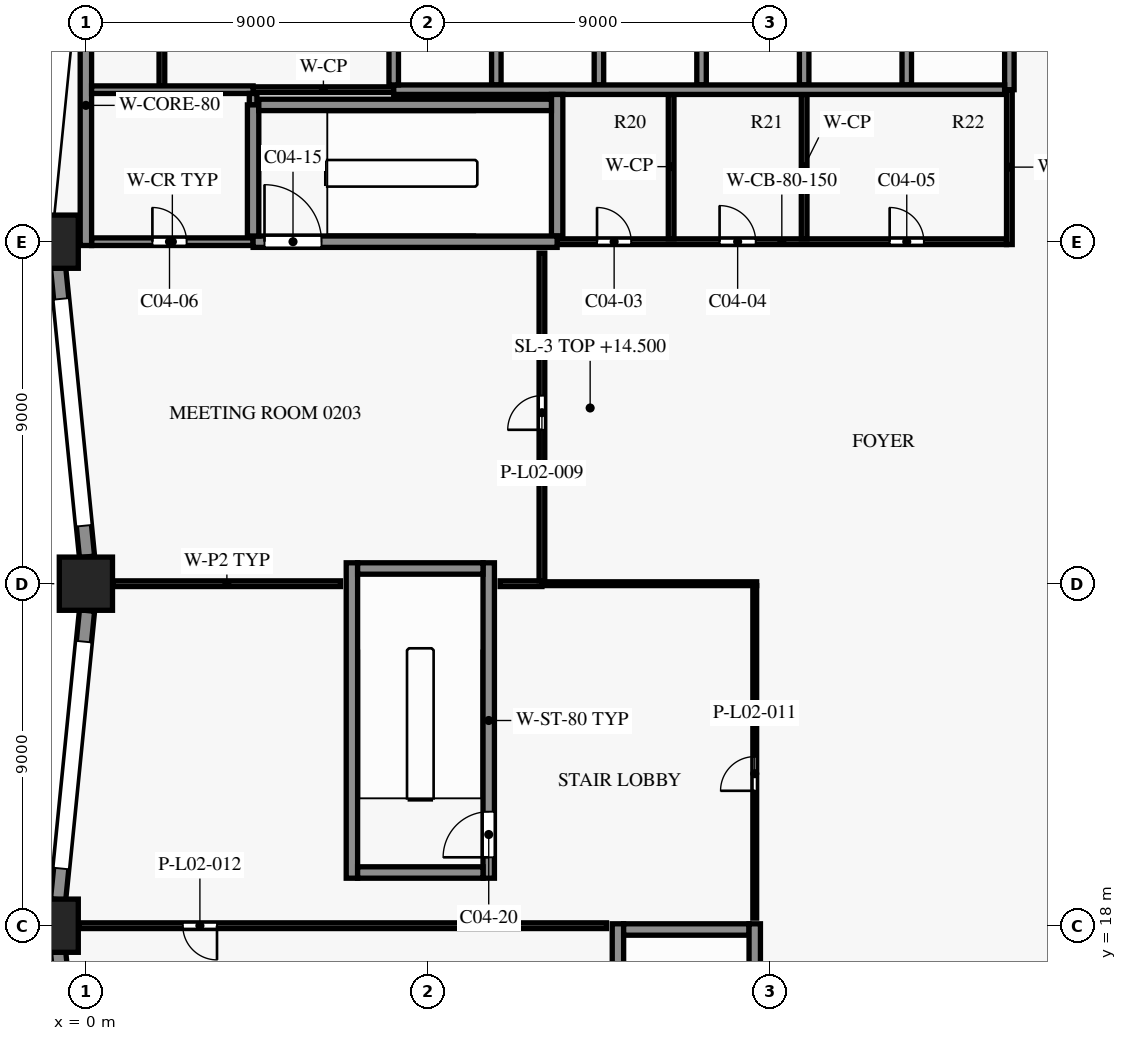
"""IFC4 building model, lengths in metres.
Left out: names, types, materials, properties, quantities, classifications, styles, units other than length and angle.
Written with IfcOpenShell. Run it as: python <this file> out.ifc"""

import sys

from ifc_helpers import new_model, si_unit, direction, frame, frame_2d, origin, origin_2d, place, context, subcontext, project, spatial, rectangle, extrude, element, fill, save


model = new_model("IFC4")
c1 = context("Model", 3, precision=1e-05, world=origin(), true_north=direction((0.0, 1.0)))
c2 = subcontext(c1, "Body", "Model", "MODEL_VIEW")
j1 = project(units=[si_unit("LENGTHUNIT", "METRE"), si_unit("PLANEANGLEUNIT", "RADIAN")], contexts=[c1])
p1 = place(None, origin())
s1 = spatial("IfcSite", under=j1, at=p1, CompositionType="ELEMENT")
p2 = place(p1, origin())
s2 = spatial("IfcBuilding", under=s1, at=p2, CompositionType="ELEMENT")
p3 = place(p2, frame((0.0, 0.0, 14.5)))
s3 = spatial("IfcBuildingStorey", under=s2, at=p3, CompositionType="ELEMENT", Elevation=14.5)
for number, where, z_axis, x_axis in (
    (1, (-0.9, 36.0, 0.0), (0.0, 0.0, 1.0), (1.0, 0.0, 0.0)),
    (2, (0.0, 27.0, 0.0), (0.0, 0.0, 1.0), (1.0, 0.0, 0.0)),
    (3, (-0.9, 18.0, 0.0), (0.0, 0.0, 1.0), (1.0, 0.0, 0.0)),
):
    element("IfcColumn", number, at=place(p3, frame(where, z_axis=z_axis, x_axis=x_axis)), inside=s3, PredefinedType="COLUMN", context=c2, shape_type="SweptSolid", body=[
        extrude(rectangle(XDim=1.4, YDim=1.4, at=origin_2d()), origin(), (0.0, 0.0, 1.0), 5.0),
    ])
p4 = place(p3, frame((0.03, 27.707, 0.0), z_axis=(0.0, 0.0, 1.0), x_axis=(-0.099478423711, 0.995039719416, 0.0)))
e4 = element("IfcWall", 4, at=p4, inside=s3, PredefinedType="SOLIDWALL", context=c2, shape_type="SweptSolid", body=[
    extrude(rectangle(XDim=7.645, YDim=0.4, at=frame_2d((3.822, 0.0))), origin(), (0.0, 0.0, 1.0), 4.1),
])
p5 = place(p4, frame((0.823, 0.0, 0.9)))
e5 = element("IfcOpeningElement", 5, at=p5, cuts=e4, PredefinedType="OPENING", context=c2, shape_type="SweptSolid", body=[
    extrude(rectangle(XDim=6.0, YDim=1.8, at=frame_2d((3.0, 0.9))), frame((0.0, 0.21, 0.0), z_axis=(0.0, -1.0, 0.0), x_axis=(1.0, 0.0, 0.0)), (0.0, 0.0, 1.0), 0.42),
])
p6 = place(p3, frame((-0.731, 18.687, 0.0), z_axis=(0.0, 0.0, 1.0), x_axis=(0.099478423711, 0.995039719416, 0.0)))
e6 = element("IfcWall", 6, at=p6, inside=s3, PredefinedType="SOLIDWALL", context=c2, shape_type="SweptSolid", body=[
    extrude(rectangle(XDim=7.645, YDim=0.4, at=frame_2d((3.822, 0.0))), origin(), (0.0, 0.0, 1.0), 4.1),
])
p7 = place(p6, frame((0.823, 0.0, 0.9)))
e7 = element("IfcOpeningElement", 7, at=p7, cuts=e6, PredefinedType="OPENING", context=c2, shape_type="SweptSolid", body=[
    extrude(rectangle(XDim=6.0, YDim=1.8, at=frame_2d((3.0, 0.9))), frame((0.0, 0.21, 0.0), z_axis=(0.0, -1.0, 0.0), x_axis=(1.0, 0.0, 0.0)), (0.0, 0.0, 1.0), 0.42),
])
p8 = place(p3, frame((0.03, 9.707, 0.0), z_axis=(0.0, 0.0, 1.0), x_axis=(-0.099478423711, 0.995039719416, 0.0)))
e8 = element("IfcWall", 8, at=p8, inside=s3, PredefinedType="SOLIDWALL", context=c2, shape_type="SweptSolid", body=[
    extrude(rectangle(XDim=7.645, YDim=0.4, at=frame_2d((3.822, 0.0))), origin(), (0.0, 0.0, 1.0), 4.1),
])
p9 = place(p8, frame((0.823, 0.0, 0.9)))
e9 = element("IfcOpeningElement", 9, at=p9, cuts=e8, PredefinedType="OPENING", context=c2, shape_type="SweptSolid", body=[
    extrude(rectangle(XDim=6.0, YDim=1.8, at=frame_2d((3.0, 0.9))), frame((0.0, 0.21, 0.0), z_axis=(0.0, -1.0, 0.0), x_axis=(1.0, 0.0, 0.0)), (0.0, 0.0, 1.0), 0.42),
])
for number, where, z_axis, x_axis in (
    (10, (14.15, 17.9, 0.0), (0.0, 0.0, 1.0), (1.0, 0.0, 0.0)),
    (11, (7.15, 19.4, 0.0), (0.0, 0.0, 1.0), (1.0, 0.0, 0.0)),
    (12, (7.15, 27.4, 0.0), (0.0, 0.0, 1.0), (1.0, 0.0, 0.0)),
):
    element("IfcWall", number, at=place(p3, frame(where, z_axis=z_axis, x_axis=x_axis)), inside=s3, PredefinedType="SHEAR", context=c2, shape_type="SweptSolid", body=[
        extrude(rectangle(XDim=3.3, YDim=0.3, at=frame_2d((1.65, 0.0))), origin(), (0.0, 0.0, 1.0), 4.7),
    ])
p10 = place(p3, frame((12.4, 36.0, 0.0), z_axis=(0.0, 0.0, 1.0), x_axis=(1.0, 0.0, 0.0)))
e13 = element("IfcWall", 13, at=p10, inside=s3, PredefinedType="SHEAR", context=c2, shape_type="SweptSolid", body=[
    extrude(rectangle(XDim=11.825, YDim=0.15, at=frame_2d((5.913, 0.0))), origin(), (0.0, 0.0, 1.0), 4.7),
])
p11 = place(p10, frame((1.05, 0.0, 0.0)))
e14 = element("IfcOpeningElement", 14, at=p11, cuts=e13, PredefinedType="OPENING", context=c2, shape_type="SweptSolid", body=[
    extrude(rectangle(XDim=0.9, YDim=2.1, at=frame_2d((0.45, 1.05))), frame((0.0, 0.085, 0.0), z_axis=(0.0, -1.0, 0.0), x_axis=(1.0, 0.0, 0.0)), (0.0, 0.0, 1.0), 0.17),
])
p12 = place(p10, frame((4.275, 0.0, 0.0)))
e15 = element("IfcOpeningElement", 15, at=p12, cuts=e13, PredefinedType="OPENING", context=c2, shape_type="SweptSolid", body=[
    extrude(rectangle(XDim=0.95, YDim=2.1, at=frame_2d((0.475, 1.05))), frame((0.0, 0.085, 0.0), z_axis=(0.0, -1.0, 0.0), x_axis=(1.0, 0.0, 0.0)), (0.0, 0.0, 1.0), 0.17),
])
p13 = place(p10, frame((8.75, 0.0, 0.0)))
e16 = element("IfcOpeningElement", 16, at=p13, cuts=e13, PredefinedType="OPENING", context=c2, shape_type="SweptSolid", body=[
    extrude(rectangle(XDim=0.9, YDim=2.1, at=frame_2d((0.45, 1.05))), frame((0.0, 0.085, 0.0), z_axis=(0.0, -1.0, 0.0), x_axis=(1.0, 0.0, 0.0)), (0.0, 0.0, 1.0), 0.17),
])
p14 = place(p3, frame((0.15, 36.0, 0.0), z_axis=(0.0, 0.0, 1.0), x_axis=(1.0, 0.0, 0.0)))
e17 = element("IfcWall", 17, at=p14, inside=s3, PredefinedType="PARTITIONING", context=c2, shape_type="SweptSolid", body=[
    extrude(rectangle(XDim=4.25, YDim=0.2, at=frame_2d((2.125, 0.0))), origin(), (0.0, 0.0, 1.0), 4.7),
])
p15 = place(p14, frame((1.6, 0.0, 0.0)))
e18 = element("IfcOpeningElement", 18, at=p15, cuts=e17, PredefinedType="OPENING", context=c2, shape_type="SweptSolid", body=[
    extrude(rectangle(XDim=0.9, YDim=2.1, at=frame_2d((0.45, 1.05))), frame((0.0, 0.11, 0.0), z_axis=(0.0, -1.0, 0.0), x_axis=(1.0, 0.0, 0.0)), (0.0, 0.0, 1.0), 0.22),
])
p16 = place(p3, frame((4.4, 36.0, 0.0), z_axis=(0.0, 0.0, 1.0), x_axis=(1.0, 0.0, 0.0)))
e19 = element("IfcWall", 19, at=p16, inside=s3, PredefinedType="SHEAR", context=c2, shape_type="SweptSolid", body=[
    extrude(rectangle(XDim=8.0, YDim=0.3, at=frame_2d((4.0, 0.0))), origin(), (0.0, 0.0, 1.0), 4.7),
])
p17 = place(p16, frame((0.3, 0.0, 0.0)))
e20 = element("IfcOpeningElement", 20, at=p17, cuts=e19, PredefinedType="OPENING", context=c2, shape_type="SweptSolid", body=[
    extrude(rectangle(XDim=1.5, YDim=2.2, at=frame_2d((0.75, 1.1))), frame((0.0, 0.16, 0.0), z_axis=(0.0, -1.0, 0.0), x_axis=(1.0, 0.0, 0.0)), (0.0, 0.0, 1.0), 0.32),
])
p18 = place(p3, frame((4.55, 39.6, 0.0), z_axis=(0.0, 0.0, 1.0), x_axis=(1.0, 0.0, 0.0)))
e21 = element("IfcWall", 21, at=p18, inside=s3, PredefinedType="SHEAR", context=c2, shape_type="SweptSolid", body=[
    extrude(rectangle(XDim=7.7, YDim=0.3, at=frame_2d((3.85, 0.0))), origin(), (0.0, 0.0, 1.0), 4.7),
])
p19 = place(p3, frame((4.4, 40.0, 0.0), z_axis=(0.0, 0.0, 1.0), x_axis=(1.0, 0.0, 0.0)))
e22 = element("IfcWall", 22, at=p19, inside=s3, PredefinedType="PARTITIONING", context=c2, shape_type="SweptSolid", body=[
    extrude(rectangle(XDim=3.7, YDim=0.15, at=frame_2d((1.85, 0.0))), origin(), (0.0, 0.0, 1.0), 4.7),
])
p20 = place(p3, frame((0.15, 40.0, 0.0), z_axis=(0.0, 0.0, 1.0), x_axis=(1.0, 0.0, 0.0)))
e23 = element("IfcWall", 23, at=p20, inside=s3, PredefinedType="PARTITIONING", context=c2, shape_type="SweptSolid", body=[
    extrude(rectangle(XDim=4.25, YDim=0.2, at=frame_2d((2.125, 0.0))), origin(), (0.0, 0.0, 1.0), 4.7),
])
p21 = place(p3, frame((8.1, 40.0, 0.0), z_axis=(0.0, 0.0, 1.0), x_axis=(1.0, 0.0, 0.0)))
e24 = element("IfcWall", 24, at=p21, inside=s3, PredefinedType="SHEAR", context=c2, shape_type="SweptSolid", body=[
    extrude(rectangle(XDim=16.075, YDim=0.25, at=frame_2d((8.038, 0.0))), origin(), (0.0, 0.0, 1.0), 4.7),
])
p22 = place(p3, frame((0.0, 35.9, 0.0), z_axis=(0.0, 0.0, 1.0), x_axis=(0.0, 1.0, 0.0)))
e25 = element("IfcWall", 25, at=p22, inside=s3, PredefinedType="SHEAR", context=c2, shape_type="SweptSolid", body=[
    extrude(rectangle(XDim=7.375, YDim=0.3, at=frame_2d((3.688, 0.0))), origin(), (0.0, 0.0, 1.0), 4.7),
])
p23 = place(p3, frame((2.0, 40.1, 0.0), z_axis=(0.0, 0.0, 1.0), x_axis=(0.0, 1.0, 0.0)))
e26 = element("IfcWall", 26, at=p23, inside=s3, PredefinedType="PARTITIONING", context=c2, shape_type="SweptSolid", body=[
    extrude(rectangle(XDim=3.025, YDim=0.15, at=frame_2d((1.512, 0.0))), origin(), (0.0, 0.0, 1.0), 4.7),
])
p24 = place(p3, frame((4.4, 39.6, 0.0), z_axis=(0.0, 0.0, 1.0), x_axis=(0.0, 1.0, 0.0)))
e27 = element("IfcWall", 27, at=p24, inside=s3, PredefinedType="PARTITIONING", context=c2, shape_type="SweptSolid", body=[
    extrude(rectangle(XDim=0.3, YDim=0.2, at=frame_2d((0.15, 0.0))), origin(), (0.0, 0.0, 1.0), 4.7),
])
p25 = place(p3, frame((4.4, 36.15, 0.0), z_axis=(0.0, 0.0, 1.0), x_axis=(0.0, 1.0, 0.0)))
e28 = element("IfcWall", 28, at=p25, inside=s3, PredefinedType="SHEAR", context=c2, shape_type="SweptSolid", body=[
    extrude(rectangle(XDim=3.45, YDim=0.3, at=frame_2d((1.725, 0.0))), origin(), (0.0, 0.0, 1.0), 4.7),
])
p26 = place(p3, frame((7.0, 19.25, 0.0), z_axis=(0.0, 0.0, 1.0), x_axis=(0.0, 1.0, 0.0)))
e29 = element("IfcWall", 29, at=p26, inside=s3, PredefinedType="SHEAR", context=c2, shape_type="SweptSolid", body=[
    extrude(rectangle(XDim=8.3, YDim=0.3, at=frame_2d((4.15, 0.0))), origin(), (0.0, 0.0, 1.0), 4.7),
])
p27 = place(p3, frame((8.1, 40.125, 0.0), z_axis=(0.0, 0.0, 1.0), x_axis=(0.0, 1.0, 0.0)))
e30 = element("IfcWall", 30, at=p27, inside=s3, PredefinedType="SHEAR", context=c2, shape_type="SweptSolid", body=[
    extrude(rectangle(XDim=2.95, YDim=0.25, at=frame_2d((1.475, 0.0))), origin(), (0.0, 0.0, 1.0), 4.7),
])
p28 = place(p3, frame((10.6, 19.25, 0.0), z_axis=(0.0, 0.0, 1.0), x_axis=(0.0, 1.0, 0.0)))
e31 = element("IfcWall", 31, at=p28, inside=s3, PredefinedType="SHEAR", context=c2, shape_type="SweptSolid", body=[
    extrude(rectangle(XDim=8.3, YDim=0.3, at=frame_2d((4.15, 0.0))), origin(), (0.0, 0.0, 1.0), 4.7),
])
p29 = place(p28, frame((0.55, 0.0, 0.0)))
e32 = element("IfcOpeningElement", 32, at=p29, cuts=e31, PredefinedType="OPENING", context=c2, shape_type="SweptSolid", body=[
    extrude(rectangle(XDim=1.2, YDim=2.2, at=frame_2d((0.6, 1.1))), frame((0.0, 0.16, 0.0), z_axis=(0.0, -1.0, 0.0), x_axis=(1.0, 0.0, 0.0)), (0.0, 0.0, 1.0), 0.32),
])
p30 = place(p3, frame((10.8, 40.125, 0.0), z_axis=(0.0, 0.0, 1.0), x_axis=(0.0, 1.0, 0.0)))
e33 = element("IfcWall", 33, at=p30, inside=s3, PredefinedType="SHEAR", context=c2, shape_type="SweptSolid", body=[
    extrude(rectangle(XDim=2.95, YDim=0.25, at=frame_2d((1.475, 0.0))), origin(), (0.0, 0.0, 1.0), 4.7),
])
p31 = place(p3, frame((12.4, 36.15, 0.0), z_axis=(0.0, 0.0, 1.0), x_axis=(0.0, 1.0, 0.0)))
e34 = element("IfcWall", 34, at=p31, inside=s3, PredefinedType="SHEAR", context=c2, shape_type="SweptSolid", body=[
    extrude(rectangle(XDim=3.725, YDim=0.3, at=frame_2d((1.863, 0.0))), origin(), (0.0, 0.0, 1.0), 4.7),
])
p32 = place(p3, frame((13.5, 40.125, 0.0), z_axis=(0.0, 0.0, 1.0), x_axis=(0.0, 1.0, 0.0)))
e35 = element("IfcWall", 35, at=p32, inside=s3, PredefinedType="SHEAR", context=c2, shape_type="SweptSolid", body=[
    extrude(rectangle(XDim=2.95, YDim=0.25, at=frame_2d((1.475, 0.0))), origin(), (0.0, 0.0, 1.0), 4.7),
])
p33 = place(p3, frame((14.0, 9.75, 0.0), z_axis=(0.0, 0.0, 1.0), x_axis=(0.0, 1.0, 0.0)))
e36 = element("IfcWall", 36, at=p33, inside=s3, PredefinedType="SHEAR", context=c2, shape_type="SweptSolid", body=[
    extrude(rectangle(XDim=8.3, YDim=0.3, at=frame_2d((4.15, 0.0))), origin(), (0.0, 0.0, 1.0), 4.7),
])
p34 = place(p3, frame((15.4, 36.075, 0.0), z_axis=(0.0, 0.0, 1.0), x_axis=(0.0, 1.0, 0.0)))
e37 = element("IfcWall", 37, at=p34, inside=s3, PredefinedType="PARTITIONING", context=c2, shape_type="SweptSolid", body=[
    extrude(rectangle(XDim=3.8, YDim=0.15, at=frame_2d((1.9, 0.0))), origin(), (0.0, 0.0, 1.0), 4.7),
])
p35 = place(p3, frame((16.2, 40.125, 0.0), z_axis=(0.0, 0.0, 1.0), x_axis=(0.0, 1.0, 0.0)))
e38 = element("IfcWall", 38, at=p35, inside=s3, PredefinedType="SHEAR", context=c2, shape_type="SweptSolid", body=[
    extrude(rectangle(XDim=2.95, YDim=0.25, at=frame_2d((1.475, 0.0))), origin(), (0.0, 0.0, 1.0), 4.7),
])
p36 = place(p3, frame((17.6, 9.75, 0.0), z_axis=(0.0, 0.0, 1.0), x_axis=(0.0, 1.0, 0.0)))
e39 = element("IfcWall", 39, at=p36, inside=s3, PredefinedType="SHEAR", context=c2, shape_type="SweptSolid", body=[
    extrude(rectangle(XDim=8.3, YDim=0.3, at=frame_2d((4.15, 0.0))), origin(), (0.0, 0.0, 1.0), 4.7),
])
p37 = place(p36, frame((0.65, 0.0, 0.0)))
e40 = element("IfcOpeningElement", 40, at=p37, cuts=e39, PredefinedType="OPENING", context=c2, shape_type="SweptSolid", body=[
    extrude(rectangle(XDim=1.2, YDim=2.2, at=frame_2d((0.6, 1.1))), frame((0.0, 0.16, 0.0), z_axis=(0.0, -1.0, 0.0), x_axis=(1.0, 0.0, 0.0)), (0.0, 0.0, 1.0), 0.32),
])
p38 = place(p3, frame((18.9, 36.075, 0.0), z_axis=(0.0, 0.0, 1.0), x_axis=(0.0, 1.0, 0.0)))
e41 = element("IfcWall", 41, at=p38, inside=s3, PredefinedType="PARTITIONING", context=c2, shape_type="SweptSolid", body=[
    extrude(rectangle(XDim=3.8, YDim=0.15, at=frame_2d((1.9, 0.0))), origin(), (0.0, 0.0, 1.0), 4.7),
])
for number, where, z_axis, x_axis in (
    (42, (18.9, 40.125, 0.0), (0.0, 0.0, 1.0), (0.0, 1.0, 0.0)),
    (43, (21.6, 40.125, 0.0), (0.0, 0.0, 1.0), (0.0, 1.0, 0.0)),
):
    element("IfcWall", number, at=place(p3, frame(where, z_axis=z_axis, x_axis=x_axis)), inside=s3, PredefinedType="SHEAR", context=c2, shape_type="SweptSolid", body=[
        extrude(rectangle(XDim=2.95, YDim=0.25, at=frame_2d((1.475, 0.0))), origin(), (0.0, 0.0, 1.0), 4.7),
    ])
p39 = place(p3, frame((24.3, 35.925, 0.0), z_axis=(0.0, 0.0, 1.0), x_axis=(0.0, 1.0, 0.0)))
e44 = element("IfcWall", 44, at=p39, inside=s3, PredefinedType="SHEAR", context=c2, shape_type="SweptSolid", body=[
    extrude(rectangle(XDim=4.075, YDim=0.15, at=frame_2d((2.038, 0.0))), origin(), (0.0, 0.0, 1.0), 4.7),
])
p40 = place(p3, frame((24.3, 40.0, 0.0), z_axis=(0.0, 0.0, 1.0), x_axis=(0.0, 1.0, 0.0)))
e45 = element("IfcWall", 45, at=p40, inside=s3, PredefinedType="SHEAR", context=c2, shape_type="SweptSolid", body=[
    extrude(rectangle(XDim=3.325, YDim=0.25, at=frame_2d((1.663, 0.0))), origin(), (0.0, 0.0, 1.0), 4.7),
])
p41 = place(p3, frame((13.7, 18.0, 0.0), z_axis=(0.0, 0.0, 1.0), x_axis=(-1.0, 0.0, 0.0)))
e46 = element("IfcWall", 46, at=p41, inside=s3, PredefinedType="PARTITIONING", context=c2, shape_type="SweptSolid", body=[
    extrude(rectangle(XDim=13.88, YDim=0.15, at=frame_2d((6.94, 0.0))), origin(), (0.0, 0.0, 1.0), 3.98),
])
p42 = place(p41, frame((10.25, 0.0, 0.0)))
e47 = element("IfcOpeningElement", 47, at=p42, cuts=e46, PredefinedType="OPENING", context=c2, shape_type="SweptSolid", body=[
    extrude(rectangle(XDim=0.9, YDim=2.1, at=frame_2d((0.45, 1.05))), frame((0.0, 0.085, 0.0), z_axis=(0.0, -1.0, 0.0), x_axis=(1.0, 0.0, 0.0)), (0.0, 0.0, 1.0), 0.17),
])
p43 = place(p3, frame((17.6, 18.2, 0.0), z_axis=(0.0, 0.0, 1.0), x_axis=(0.0, 1.0, 0.0)))
e48 = element("IfcWall", 48, at=p43, inside=s3, PredefinedType="PARTITIONING", context=c2, shape_type="SweptSolid", body=[
    extrude(rectangle(XDim=8.75, YDim=0.1, at=frame_2d((4.375, 0.0))), origin(), (0.0, 0.0, 1.0), 3.98),
])
p44 = place(p43, frame((3.35, 0.0, 0.0)))
e49 = element("IfcOpeningElement", 49, at=p44, cuts=e48, PredefinedType="OPENING", context=c2, shape_type="SweptSolid", body=[
    extrude(rectangle(XDim=0.9, YDim=2.1, at=frame_2d((0.45, 1.05))), frame((0.0, 0.06, 0.0), z_axis=(0.0, -1.0, 0.0), x_axis=(1.0, 0.0, 0.0)), (0.0, 0.0, 1.0), 0.12),
])
p45 = place(p3, frame((0.72, 27.0, 0.0), z_axis=(0.0, 0.0, 1.0), x_axis=(1.0, 0.0, 0.0)))
e50 = element("IfcWall", 50, at=p45, inside=s3, PredefinedType="PARTITIONING", context=c2, shape_type="SweptSolid", body=[
    extrude(rectangle(XDim=5.98, YDim=0.15, at=frame_2d((2.99, 0.0))), origin(), (0.0, 0.0, 1.0), 3.98),
])
p46 = place(p3, frame((10.9, 27.0, 0.0), z_axis=(0.0, 0.0, 1.0), x_axis=(1.0, 0.0, 0.0)))
e51 = element("IfcWall", 51, at=p46, inside=s3, PredefinedType="PARTITIONING", context=c2, shape_type="SweptSolid", body=[
    extrude(rectangle(XDim=1.1, YDim=0.15, at=frame_2d((0.55, 0.0))), origin(), (0.0, 0.0, 1.0), 3.98),
])
p47 = place(p3, frame((17.65, 27.0, 0.0), z_axis=(0.0, 0.0, 1.0), x_axis=(-1.0, 0.0, 0.0)))
e52 = element("IfcWall", 52, at=p47, inside=s3, PredefinedType="PARTITIONING", context=c2, shape_type="SweptSolid", body=[
    extrude(rectangle(XDim=5.65, YDim=0.1, at=frame_2d((2.825, 0.0))), origin(), (0.0, 0.0, 1.0), 3.98),
])
p48 = place(p3, frame((12.0, 27.075, 0.0), z_axis=(0.0, 0.0, 1.0), x_axis=(0.0, 1.0, 0.0)))
e53 = element("IfcWall", 53, at=p48, inside=s3, PredefinedType="PARTITIONING", context=c2, shape_type="SweptSolid", body=[
    extrude(rectangle(XDim=8.625, YDim=0.15, at=frame_2d((4.312, 0.0))), origin(), (0.0, 0.0, 1.0), 3.98),
])
p49 = place(p48, frame((3.975, 0.0, 0.0)))
e54 = element("IfcOpeningElement", 54, at=p49, cuts=e53, PredefinedType="OPENING", context=c2, shape_type="SweptSolid", body=[
    extrude(rectangle(XDim=0.9, YDim=2.1, at=frame_2d((0.45, 1.05))), frame((0.0, 0.085, 0.0), z_axis=(0.0, -1.0, 0.0), x_axis=(1.0, 0.0, 0.0)), (0.0, 0.0, 1.0), 0.17),
])
p50 = place(p5, origin())
e55 = element("IfcWindow", 55, at=p50, inside=s3, PartitioningType="SINGLE_PANEL", PredefinedType="WINDOW", context=c2, shape_type="SweptSolid", body=[
    extrude(rectangle(XDim=6.0, YDim=1.8, at=frame_2d((3.0, 0.9))), frame((0.0, 0.03, 0.0), z_axis=(0.0, -1.0, 0.0), x_axis=(1.0, 0.0, 0.0)), (0.0, 0.0, 1.0), 0.06),
])
fill(e5, e55)
p51 = place(p7, origin())
e56 = element("IfcWindow", 56, at=p51, inside=s3, PartitioningType="SINGLE_PANEL", PredefinedType="WINDOW", context=c2, shape_type="SweptSolid", body=[
    extrude(rectangle(XDim=6.0, YDim=1.8, at=frame_2d((3.0, 0.9))), frame((0.0, 0.03, 0.0), z_axis=(0.0, -1.0, 0.0), x_axis=(1.0, 0.0, 0.0)), (0.0, 0.0, 1.0), 0.06),
])
fill(e7, e56)
p52 = place(p11, origin())
e57 = element("IfcDoor", 57, at=p52, inside=s3, OperationType="SINGLE_SWING_RIGHT", PredefinedType="DOOR", context=c2, shape_type="SweptSolid", body=[
    extrude(rectangle(XDim=0.9, YDim=2.1, at=frame_2d((0.45, 1.05))), frame((0.0, 0.025, 0.0), z_axis=(0.0, -1.0, 0.0), x_axis=(1.0, 0.0, 0.0)), (0.0, 0.0, 1.0), 0.05),
])
fill(e14, e57)
p53 = place(p12, origin())
e58 = element("IfcDoor", 58, at=p53, inside=s3, OperationType="SINGLE_SWING_LEFT", PredefinedType="DOOR", context=c2, shape_type="SweptSolid", body=[
    extrude(rectangle(XDim=0.95, YDim=2.1, at=frame_2d((0.475, 1.05))), frame((0.0, 0.025, 0.0), z_axis=(0.0, -1.0, 0.0), x_axis=(1.0, 0.0, 0.0)), (0.0, 0.0, 1.0), 0.05),
])
fill(e15, e58)
p54 = place(p13, origin())
e59 = element("IfcDoor", 59, at=p54, inside=s3, OperationType="SINGLE_SWING_RIGHT", PredefinedType="DOOR", context=c2, shape_type="SweptSolid", body=[
    extrude(rectangle(XDim=0.9, YDim=2.1, at=frame_2d((0.45, 1.05))), frame((0.0, 0.025, 0.0), z_axis=(0.0, -1.0, 0.0), x_axis=(1.0, 0.0, 0.0)), (0.0, 0.0, 1.0), 0.05),
])
fill(e16, e59)
p55 = place(p15, origin())
e60 = element("IfcDoor", 60, at=p55, inside=s3, OperationType="SINGLE_SWING_LEFT", PredefinedType="DOOR", context=c2, shape_type="SweptSolid", body=[
    extrude(rectangle(XDim=0.9, YDim=2.1, at=frame_2d((0.45, 1.05))), frame((0.0, 0.025, 0.0), z_axis=(0.0, -1.0, 0.0), x_axis=(1.0, 0.0, 0.0)), (0.0, 0.0, 1.0), 0.05),
])
fill(e18, e60)
p56 = place(p17, origin())
e61 = element("IfcDoor", 61, at=p56, inside=s3, OperationType="SINGLE_SWING_RIGHT", PredefinedType="DOOR", context=c2, shape_type="SweptSolid", body=[
    extrude(rectangle(XDim=1.5, YDim=2.2, at=frame_2d((0.75, 1.1))), frame((0.0, 0.025, 0.0), z_axis=(0.0, -1.0, 0.0), x_axis=(1.0, 0.0, 0.0)), (0.0, 0.0, 1.0), 0.05),
])
fill(e20, e61)
p57 = place(p29, origin())
e62 = element("IfcDoor", 62, at=p57, inside=s3, OperationType="SINGLE_SWING_RIGHT", PredefinedType="DOOR", context=c2, shape_type="SweptSolid", body=[
    extrude(rectangle(XDim=1.2, YDim=2.2, at=frame_2d((0.6, 1.1))), frame((0.0, 0.025, 0.0), z_axis=(0.0, -1.0, 0.0), x_axis=(1.0, 0.0, 0.0)), (0.0, 0.0, 1.0), 0.05),
])
fill(e32, e62)
p58 = place(p49, origin())
e63 = element("IfcDoor", 63, at=p58, inside=s3, OperationType="SINGLE_SWING_RIGHT", PredefinedType="DOOR", context=c2, shape_type="SweptSolid", body=[
    extrude(rectangle(XDim=0.9, YDim=2.1, at=frame_2d((0.45, 1.05))), frame((0.0, 0.025, 0.0), z_axis=(0.0, -1.0, 0.0), x_axis=(1.0, 0.0, 0.0)), (0.0, 0.0, 1.0), 0.05),
])
fill(e54, e63)
p59 = place(p44, origin())
e64 = element("IfcDoor", 64, at=p59, inside=s3, OperationType="SINGLE_SWING_LEFT", PredefinedType="DOOR", context=c2, shape_type="SweptSolid", body=[
    extrude(rectangle(XDim=0.9, YDim=2.1, at=frame_2d((0.45, 1.05))), frame((0.0, 0.025, 0.0), z_axis=(0.0, -1.0, 0.0), x_axis=(1.0, 0.0, 0.0)), (0.0, 0.0, 1.0), 0.05),
])
fill(e49, e64)
p60 = place(p42, origin())
e65 = element("IfcDoor", 65, at=p60, inside=s3, OperationType="SINGLE_SWING_RIGHT", PredefinedType="DOOR", context=c2, shape_type="SweptSolid", body=[
    extrude(rectangle(XDim=0.9, YDim=2.1, at=frame_2d((0.45, 1.05))), frame((0.0, 0.025, 0.0), z_axis=(0.0, -1.0, 0.0), x_axis=(1.0, 0.0, 0.0)), (0.0, 0.0, 1.0), 0.05),
])
fill(e47, e65)
save(model, sys.argv[1])
